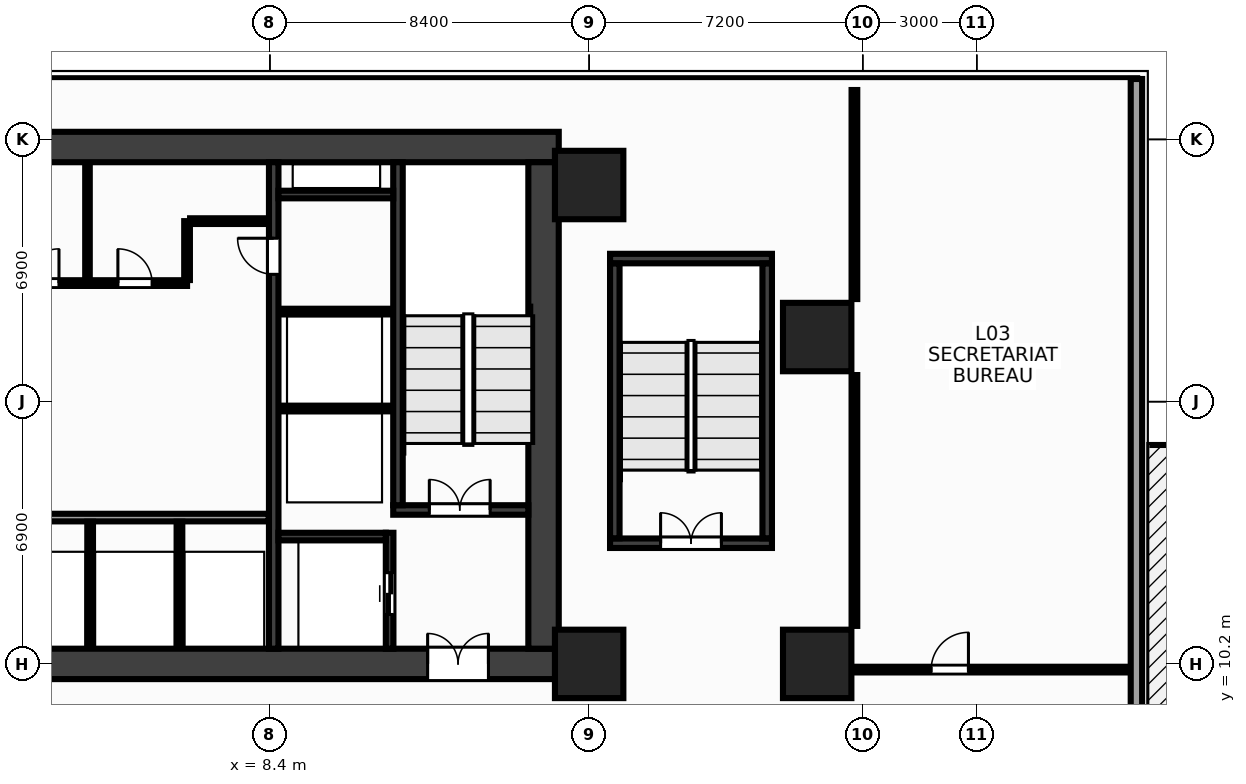
"""IFC4 building model, lengths in metres.
Left out: names, types, materials, properties, quantities, classifications, styles, units other than length and angle.
Written with IfcOpenShell. Run it as: python <this file> out.ifc"""

import sys

from ifc_helpers import new_model, si_unit, direction, frame, frame_2d, origin, origin_2d, place, context, subcontext, project, spatial, rectangle, extrude, source, transform, mapped, element, fill, save


model = new_model("IFC4")
c1 = context("Model", 3, precision=1e-05, world=origin(), true_north=direction((0.0, 1.0)))
c2 = subcontext(c1, "Body", "Model", "MODEL_VIEW")
j1 = project(units=[si_unit("LENGTHUNIT", "METRE"), si_unit("PLANEANGLEUNIT", "RADIAN")], contexts=[c1])
p1 = place(None, origin())
s1 = spatial("IfcSite", under=j1, at=p1, CompositionType="ELEMENT")
p2 = place(p1, origin())
s2 = spatial("IfcBuilding", under=s1, at=p2, CompositionType="ELEMENT")
p3 = place(p2, frame((0.0, 0.0, 14.3)))
s3 = spatial("IfcBuildingStorey", under=s2, at=p3, CompositionType="ELEMENT", Elevation=14.3)
m1 = source(origin(), c2, "Body", "SweptSolid", [
    extrude(rectangle(XDim=32.0, YDim=0.8, at=frame_2d((16.0, 0.0))), origin(), (0.0, 0.0, 1.0), 4.65),
])
p4 = place(p3, frame((-16.0, 23.8, 0.0), z_axis=(0.0, 0.0, 1.0), x_axis=(1.0, 0.0, 0.0)))
e1 = element("IfcWall", 1, at=p4, inside=s3, PredefinedType="SHEAR", context=c2, shape_type="MappedRepresentation", body=[
    mapped(m1, transform((0.0, 0.0, 0.0), x_axis=(1.0, 0.0, 0.0), y_axis=(0.0, 1.0, 0.0), z_axis=(0.0, 0.0, 1.0), scale=1.0)),
])
p5 = place(p3, frame((-16.0, 10.2, 0.0), z_axis=(0.0, 0.0, 1.0), x_axis=(1.0, 0.0, 0.0)))
e2 = element("IfcWall", 2, at=p5, inside=s3, PredefinedType="SHEAR", context=c2, shape_type="MappedRepresentation", body=[
    mapped(m1, transform((0.0, 0.0, 0.0), x_axis=(1.0, 0.0, 0.0), y_axis=(0.0, 1.0, 0.0), z_axis=(0.0, 0.0, 1.0), scale=1.0)),
])
p6 = place(p5, frame((1.85, 0.0, 0.0)))
e3 = element("IfcOpeningElement", 3, at=p6, cuts=e2, PredefinedType="OPENING", context=c2, shape_type="SweptSolid", body=[
    extrude(rectangle(XDim=1.6, YDim=2.15, at=frame_2d((0.8, 1.075))), frame((0.0, 0.412, 0.0), z_axis=(0.0, -1.0, 0.0), x_axis=(1.0, 0.0, 0.0)), (0.0, 0.0, 1.0), 0.824),
])
p7 = place(p5, frame((28.55, 0.0, 0.0)))
e4 = element("IfcOpeningElement", 4, at=p7, cuts=e2, PredefinedType="OPENING", context=c2, shape_type="SweptSolid", body=[
    extrude(rectangle(XDim=1.6, YDim=2.15, at=frame_2d((0.8, 1.075))), frame((0.0, 0.412, 0.0), z_axis=(0.0, -1.0, 0.0), x_axis=(1.0, 0.0, 0.0)), (0.0, 0.0, 1.0), 0.824),
])
p8 = place(p5, frame((15.25, 0.0, 0.0)))
e5 = element("IfcOpeningElement", 5, at=p8, cuts=e2, PredefinedType="OPENING", context=c2, shape_type="SweptSolid", body=[
    extrude(rectangle(XDim=1.5, YDim=2.2, at=frame_2d((0.75, 1.1))), frame((0.0, 0.412, 0.0), z_axis=(0.0, -1.0, 0.0), x_axis=(1.0, 0.0, 0.0)), (0.0, 0.0, 1.0), 0.824),
])
m2 = source(origin(), c2, "Body", "SweptSolid", [
    extrude(rectangle(XDim=12.8, YDim=0.8, at=frame_2d((6.4, 0.0))), origin(), (0.0, 0.0, 1.0), 4.65),
])
p9 = place(p3, frame((15.6, 10.6, 0.0), z_axis=(0.0, 0.0, 1.0), x_axis=(0.0, 1.0, 0.0)))
e6 = element("IfcWall", 6, at=p9, inside=s3, PredefinedType="SHEAR", context=c2, shape_type="MappedRepresentation", body=[
    mapped(m2, transform((0.0, 0.0, 0.0), x_axis=(1.0, 0.0, 0.0), y_axis=(0.0, 1.0, 0.0), z_axis=(0.0, 0.0, 1.0), scale=1.0)),
])
m3 = source(origin(), c2, "Body", "SweptSolid", [
    extrude(rectangle(XDim=12.8, YDim=0.25, at=frame_2d((6.4, 0.0))), origin(), (0.0, 0.0, 1.0), 4.65),
])
p10 = place(p3, frame((8.5, 10.6, 0.0), z_axis=(0.0, 0.0, 1.0), x_axis=(0.0, 1.0, 0.0)))
e7 = element("IfcWall", 7, at=p10, inside=s3, PredefinedType="SHEAR", context=c2, shape_type="MappedRepresentation", body=[
    mapped(m3, transform((0.0, 0.0, 0.0), x_axis=(1.0, 0.0, 0.0), y_axis=(0.0, 1.0, 0.0), z_axis=(0.0, 0.0, 1.0), scale=1.0)),
])
p11 = place(p10, frame((9.85, 0.0, 0.0)))
e8 = element("IfcOpeningElement", 8, at=p11, cuts=e7, PredefinedType="OPENING", context=c2, shape_type="SweptSolid", body=[
    extrude(rectangle(XDim=0.95, YDim=2.15, at=frame_2d((0.475, 1.075))), frame((0.0, 0.137, 0.0), z_axis=(0.0, -1.0, 0.0), x_axis=(1.0, 0.0, 0.0)), (0.0, 0.0, 1.0), 0.274),
])
m4 = source(origin(), c2, "Body", "SweptSolid", [
    extrude(rectangle(XDim=3.555, YDim=0.25, at=frame_2d((1.777, 0.0))), origin(), (0.0, 0.0, 1.0), 4.65),
])
p12 = place(p3, frame((11.645, 14.25, 0.0), z_axis=(0.0, 0.0, 1.0), x_axis=(1.0, 0.0, 0.0)))
e9 = element("IfcWall", 9, at=p12, inside=s3, PredefinedType="SHEAR", context=c2, shape_type="MappedRepresentation", body=[
    mapped(m4, transform((0.0, 0.0, 0.0), x_axis=(1.0, 0.0, 0.0), y_axis=(0.0, 1.0, 0.0), z_axis=(0.0, 0.0, 1.0), scale=1.0)),
])
p13 = place(p12, frame((0.95, 0.0, 0.0)))
e10 = element("IfcOpeningElement", 10, at=p13, cuts=e9, PredefinedType="OPENING", context=c2, shape_type="SweptSolid", body=[
    extrude(rectangle(XDim=1.6, YDim=2.15, at=frame_2d((0.8, 1.075))), frame((0.0, 0.137, 0.0), z_axis=(0.0, -1.0, 0.0), x_axis=(1.0, 0.0, 0.0)), (0.0, 0.0, 1.0), 0.274),
])
m5 = source(origin(), c2, "Body", "SweptSolid", [
    extrude(rectangle(XDim=9.025, YDim=0.25, at=frame_2d((4.512, 0.0))), origin(), (0.0, 0.0, 1.0), 4.65),
])
p14 = place(p3, frame((11.77, 14.375, 0.0), z_axis=(0.0, 0.0, 1.0), x_axis=(0.0, 1.0, 0.0)))
e11 = element("IfcWall", 11, at=p14, inside=s3, PredefinedType="SHEAR", context=c2, shape_type="MappedRepresentation", body=[
    mapped(m5, transform((0.0, 0.0, 0.0), x_axis=(1.0, 0.0, 0.0), y_axis=(0.0, 1.0, 0.0), z_axis=(0.0, 0.0, 1.0), scale=1.0)),
])
m6 = source(origin(), c2, "Body", "SweptSolid", [
    extrude(rectangle(XDim=3.05, YDim=0.2, at=frame_2d((1.525, 0.0))), origin(), (0.0, 0.0, 1.0), 4.65),
])
p15 = place(p3, frame((11.55, 10.6, 0.0), z_axis=(0.0, 0.0, 1.0), x_axis=(0.0, 1.0, 0.0)))
e12 = element("IfcWall", 12, at=p15, inside=s3, PredefinedType="SHEAR", context=c2, shape_type="MappedRepresentation", body=[
    mapped(m6, transform((0.0, 0.0, 0.0), x_axis=(1.0, 0.0, 0.0), y_axis=(0.0, 1.0, 0.0), z_axis=(0.0, 0.0, 1.0), scale=1.0)),
])
p16 = place(p15, frame((0.9, 0.0, 0.0)))
e13 = element("IfcOpeningElement", 13, at=p16, cuts=e12, PredefinedType="OPENING", context=c2, shape_type="SweptSolid", body=[
    extrude(rectangle(XDim=1.1, YDim=2.15, at=frame_2d((0.55, 1.075))), frame((0.0, 0.112, 0.0), z_axis=(0.0, -1.0, 0.0), x_axis=(1.0, 0.0, 0.0)), (0.0, 0.0, 1.0), 0.224),
])
m7 = source(origin(), c2, "Body", "SweptSolid", [
    extrude(rectangle(XDim=2.825, YDim=0.2, at=frame_2d((1.413, 0.0))), origin(), (0.0, 0.0, 1.0), 4.65),
])
p17 = place(p3, frame((8.625, 13.55, 0.0), z_axis=(0.0, 0.0, 1.0), x_axis=(1.0, 0.0, 0.0)))
e14 = element("IfcWall", 14, at=p17, inside=s3, PredefinedType="SHEAR", context=c2, shape_type="MappedRepresentation", body=[
    mapped(m7, transform((0.0, 0.0, 0.0), x_axis=(1.0, 0.0, 0.0), y_axis=(0.0, 1.0, 0.0), z_axis=(0.0, 0.0, 1.0), scale=1.0)),
])
m8 = source(origin(), c2, "Body", "SweptSolid", [
    extrude(rectangle(XDim=3.02, YDim=0.2, at=frame_2d((1.51, 0.0))), origin(), (0.0, 0.0, 1.0), 4.65),
])
p18 = place(p3, frame((8.625, 22.55, 0.0), z_axis=(0.0, 0.0, 1.0), x_axis=(1.0, 0.0, 0.0)))
e15 = element("IfcWall", 15, at=p18, inside=s3, PredefinedType="SHEAR", context=c2, shape_type="MappedRepresentation", body=[
    mapped(m8, transform((0.0, 0.0, 0.0), x_axis=(1.0, 0.0, 0.0), y_axis=(0.0, 1.0, 0.0), z_axis=(0.0, 0.0, 1.0), scale=1.0)),
])
m9 = source(origin(), c2, "Body", "SweptSolid", [
    extrude(rectangle(XDim=4.26, YDim=0.25, at=frame_2d((2.13, 0.0))), origin(), (0.0, 0.0, 1.0), 4.65),
])
p19 = place(p3, frame((17.35, 20.865, 0.0), z_axis=(0.0, 0.0, 1.0), x_axis=(1.0, 0.0, 0.0)))
e16 = element("IfcWall", 16, at=p19, inside=s3, PredefinedType="SHEAR", context=c2, shape_type="MappedRepresentation", body=[
    mapped(m9, transform((0.0, 0.0, 0.0), x_axis=(1.0, 0.0, 0.0), y_axis=(0.0, 1.0, 0.0), z_axis=(0.0, 0.0, 1.0), scale=1.0)),
])
p20 = place(p3, frame((17.35, 13.375, 0.0), z_axis=(0.0, 0.0, 1.0), x_axis=(1.0, 0.0, 0.0)))
e17 = element("IfcWall", 17, at=p20, inside=s3, PredefinedType="SHEAR", context=c2, shape_type="MappedRepresentation", body=[
    mapped(m9, transform((0.0, 0.0, 0.0), x_axis=(1.0, 0.0, 0.0), y_axis=(0.0, 1.0, 0.0), z_axis=(0.0, 0.0, 1.0), scale=1.0)),
])
p21 = place(p20, frame((1.33, 0.0, 0.0)))
e18 = element("IfcOpeningElement", 18, at=p21, cuts=e17, PredefinedType="OPENING", context=c2, shape_type="SweptSolid", body=[
    extrude(rectangle(XDim=1.6, YDim=2.15, at=frame_2d((0.8, 1.075))), frame((0.0, 0.137, 0.0), z_axis=(0.0, -1.0, 0.0), x_axis=(1.0, 0.0, 0.0)), (0.0, 0.0, 1.0), 0.274),
])
m10 = source(origin(), c2, "Body", "SweptSolid", [
    extrude(rectangle(XDim=7.23, YDim=0.25, at=frame_2d((3.615, 0.0))), origin(), (0.0, 0.0, 1.0), 4.65),
])
for number, where, z_axis, x_axis in (
    (19, (17.475, 13.505, 0.0), (0.0, 0.0, 1.0), (0.0, 1.0, 0.0)),
    (20, (21.485, 13.505, 0.0), (0.0, 0.0, 1.0), (0.0, 1.0, 0.0)),
):
    element("IfcWall", number, at=place(p3, frame(where, z_axis=z_axis, x_axis=x_axis)), inside=s3, PredefinedType="SHEAR", context=c2, shape_type="MappedRepresentation", body=[
        mapped(m10, transform((0.0, 0.0, 0.0), x_axis=(1.0, 0.0, 0.0), y_axis=(0.0, 1.0, 0.0), z_axis=(0.0, 0.0, 1.0), scale=1.0)),
    ])
m11 = source(origin(), c2, "Body", "SweptSolid", [
    extrude(rectangle(XDim=1.8, YDim=1.8, at=origin_2d()), origin(), (0.0, 0.0, 1.0), 4.65),
])
for number, where, z_axis, x_axis in (
    (21, (16.8, 10.2, 0.0), (0.0, 0.0, 1.0), (1.0, 0.0, 0.0)),
    (22, (16.8, 22.8, 0.0), (0.0, 0.0, 1.0), (1.0, 0.0, 0.0)),
    (23, (22.8, 10.2, 0.0), (0.0, 0.0, 1.0), (1.0, 0.0, 0.0)),
    (24, (22.8, 18.8, 0.0), (0.0, 0.0, 1.0), (1.0, 0.0, 0.0)),
):
    element("IfcColumn", number, at=place(p3, frame(where, z_axis=z_axis, x_axis=x_axis)), inside=s3, PredefinedType="COLUMN", context=c2, shape_type="MappedRepresentation", body=[
        mapped(m11, transform((0.0, 0.0, 0.0), x_axis=(1.0, 0.0, 0.0), y_axis=(0.0, 1.0, 0.0), z_axis=(0.0, 0.0, 1.0), scale=1.0)),
    ])
m12 = source(origin(), c2, "Body", "SweptSolid", [
    extrude(rectangle(XDim=52.79, YDim=0.3, at=frame_2d((26.395, 0.0))), origin(), (0.0, 0.0, 1.0), 3.83),
])
p22 = place(p3, frame((31.2, 25.59, 0.0), z_axis=(0.0, 0.0, 1.0), x_axis=(0.0, -1.0, 0.0)))
e25 = element("IfcWall", 25, at=p22, inside=s3, PredefinedType="STANDARD", context=c2, shape_type="MappedRepresentation", body=[
    mapped(m12, transform((0.0, 0.0, 0.0), x_axis=(1.0, 0.0, 0.0), y_axis=(0.0, 1.0, 0.0), z_axis=(0.0, 0.0, 1.0), scale=1.0)),
])
p23 = place(p22, frame((30.65, 0.0, 0.0)))
e26 = element("IfcOpeningElement", 26, at=p23, cuts=e25, PredefinedType="OPENING", context=c2, shape_type="SweptSolid", body=[
    extrude(rectangle(XDim=1.8, YDim=2.2, at=frame_2d((0.9, 1.1))), frame((0.0, 0.162, 0.0), z_axis=(0.0, -1.0, 0.0), x_axis=(1.0, 0.0, 0.0)), (0.0, 0.0, 1.0), 0.324),
])
m13 = source(origin(), c2, "Body", "SweptSolid", [
    extrude(rectangle(XDim=3.01, YDim=0.15, at=frame_2d((1.505, 0.0))), origin(), (0.0, 0.0, 1.0), 4.33),
])
for number, where, z_axis, x_axis in (
    (27, (8.63, 16.92, 0.0), (0.0, 0.0, 1.0), (1.0, 0.0, 0.0)),
    (28, (8.63, 19.47, 0.0), (0.0, 0.0, 1.0), (1.0, 0.0, 0.0)),
):
    element("IfcWall", number, at=place(p3, frame(where, z_axis=z_axis, x_axis=x_axis)), inside=s3, PredefinedType="PARTITIONING", context=c2, shape_type="MappedRepresentation", body=[
        mapped(m13, transform((0.0, 0.0, 0.0), x_axis=(1.0, 0.0, 0.0), y_axis=(0.0, 1.0, 0.0), z_axis=(0.0, 0.0, 1.0), scale=1.0)),
    ])
m14 = source(origin(), c2, "Body", "SweptSolid", [
    extrude(rectangle(XDim=7.07, YDim=0.2, at=frame_2d((3.535, 0.0))), origin(), (0.0, 0.0, 1.0), 4.33),
])
p24 = place(p3, frame((1.3, 14.05, 0.0), z_axis=(0.0, 0.0, 1.0), x_axis=(1.0, 0.0, 0.0)))
e29 = element("IfcWall", 29, at=p24, inside=s3, PredefinedType="PARTITIONING", context=c2, shape_type="MappedRepresentation", body=[
    mapped(m14, transform((0.0, 0.0, 0.0), x_axis=(1.0, 0.0, 0.0), y_axis=(0.0, 1.0, 0.0), z_axis=(0.0, 0.0, 1.0), scale=1.0)),
])
m15 = source(origin(), c2, "Body", "SweptSolid", [
    extrude(rectangle(XDim=14.59, YDim=0.15, at=frame_2d((7.295, 0.0))), origin(), (0.0, 0.0, 1.0), 4.33),
])
p25 = place(p3, frame((-8.37, 20.22, 0.0), z_axis=(0.0, 0.0, 1.0), x_axis=(1.0, 0.0, 0.0)))
e30 = element("IfcWall", 30, at=p25, inside=s3, PredefinedType="PARTITIONING", context=c2, shape_type="MappedRepresentation", body=[
    mapped(m15, transform((0.0, 0.0, 0.0), x_axis=(1.0, 0.0, 0.0), y_axis=(0.0, 1.0, 0.0), z_axis=(0.0, 0.0, 1.0), scale=1.0)),
])
p26 = place(p25, frame((4.36, 0.0, 0.0)))
e31 = element("IfcOpeningElement", 31, at=p26, cuts=e30, PredefinedType="OPENING", context=c2, shape_type="SweptSolid", body=[
    extrude(rectangle(XDim=0.9, YDim=2.15, at=frame_2d((0.45, 1.075))), frame((0.0, 0.087, 0.0), z_axis=(0.0, -1.0, 0.0), x_axis=(1.0, 0.0, 0.0)), (0.0, 0.0, 1.0), 0.174),
])
p27 = place(p25, frame((10.32, 0.0, 0.0)))
e32 = element("IfcOpeningElement", 32, at=p27, cuts=e30, PredefinedType="OPENING", context=c2, shape_type="SweptSolid", body=[
    extrude(rectangle(XDim=0.9, YDim=2.15, at=frame_2d((0.45, 1.075))), frame((0.0, 0.087, 0.0), z_axis=(0.0, -1.0, 0.0), x_axis=(1.0, 0.0, 0.0)), (0.0, 0.0, 1.0), 0.174),
])
p28 = place(p25, frame((12.77, 0.0, 0.0)))
e33 = element("IfcOpeningElement", 33, at=p28, cuts=e30, PredefinedType="OPENING", context=c2, shape_type="SweptSolid", body=[
    extrude(rectangle(XDim=0.9, YDim=2.15, at=frame_2d((0.45, 1.075))), frame((0.0, 0.087, 0.0), z_axis=(0.0, -1.0, 0.0), x_axis=(1.0, 0.0, 0.0)), (0.0, 0.0, 1.0), 0.174),
])
m16 = source(origin(), c2, "Body", "SweptSolid", [
    extrude(rectangle(XDim=1.55, YDim=0.15, at=frame_2d((0.775, 0.0))), origin(), (0.0, 0.0, 1.0), 4.33),
])
p29 = place(p3, frame((6.22, 20.3, 0.0), z_axis=(0.0, 0.0, 1.0), x_axis=(0.0, 1.0, 0.0)))
e34 = element("IfcWall", 34, at=p29, inside=s3, PredefinedType="PARTITIONING", context=c2, shape_type="MappedRepresentation", body=[
    mapped(m16, transform((0.0, 0.0, 0.0), x_axis=(1.0, 0.0, 0.0), y_axis=(0.0, 1.0, 0.0), z_axis=(0.0, 0.0, 1.0), scale=1.0)),
])
m17 = source(origin(), c2, "Body", "SweptSolid", [
    extrude(rectangle(XDim=2.07, YDim=0.15, at=frame_2d((1.035, 0.0))), origin(), (0.0, 0.0, 1.0), 4.33),
])
p30 = place(p3, frame((6.3, 21.85, 0.0), z_axis=(0.0, 0.0, 1.0), x_axis=(1.0, 0.0, 0.0)))
e35 = element("IfcWall", 35, at=p30, inside=s3, PredefinedType="PARTITIONING", context=c2, shape_type="MappedRepresentation", body=[
    mapped(m17, transform((0.0, 0.0, 0.0), x_axis=(1.0, 0.0, 0.0), y_axis=(0.0, 1.0, 0.0), z_axis=(0.0, 0.0, 1.0), scale=1.0)),
])
m18 = source(origin(), c2, "Body", "SweptSolid", [
    extrude(rectangle(XDim=3.34, YDim=0.15, at=frame_2d((1.67, 0.0))), origin(), (0.0, 0.0, 1.0), 4.33),
])
for number, where, z_axis, x_axis in (
    (36, (3.67, 10.6, 0.0), (0.0, 0.0, 1.0), (0.0, 1.0, 0.0)),
    (37, (6.02, 10.6, 0.0), (0.0, 0.0, 1.0), (0.0, 1.0, 0.0)),
):
    element("IfcWall", number, at=place(p3, frame(where, z_axis=z_axis, x_axis=x_axis)), inside=s3, PredefinedType="PARTITIONING", context=c2, shape_type="MappedRepresentation", body=[
        mapped(m18, transform((0.0, 0.0, 0.0), x_axis=(1.0, 0.0, 0.0), y_axis=(0.0, 1.0, 0.0), z_axis=(0.0, 0.0, 1.0), scale=1.0)),
    ])
m19 = source(origin(), c2, "Body", "SweptSolid", [
    extrude(rectangle(XDim=3.04, YDim=0.12, at=frame_2d((1.52, 0.0))), origin(), (0.0, 0.0, 1.0), 4.33),
])
p31 = place(p3, frame((3.6, 20.32, 0.0), z_axis=(0.0, 0.0, 1.0), x_axis=(0.0, 1.0, 0.0)))
e38 = element("IfcWall", 38, at=p31, inside=s3, PredefinedType="PARTITIONING", context=c2, shape_type="MappedRepresentation", body=[
    mapped(m19, transform((0.0, 0.0, 0.0), x_axis=(1.0, 0.0, 0.0), y_axis=(0.0, 1.0, 0.0), z_axis=(0.0, 0.0, 1.0), scale=1.0)),
])
m20 = source(origin(), c2, "Body", "SweptSolid", [
    extrude(rectangle(XDim=7.2, YDim=0.15, at=frame_2d((3.6, 0.0))), origin(), (0.0, 0.0, 1.0), 4.33),
])
p32 = place(p3, frame((23.8, 10.05, 0.0), z_axis=(0.0, 0.0, 1.0), x_axis=(1.0, 0.0, 0.0)))
e39 = element("IfcWall", 39, at=p32, inside=s3, PredefinedType="PARTITIONING", context=c2, shape_type="MappedRepresentation", body=[
    mapped(m20, transform((0.0, 0.0, 0.0), x_axis=(1.0, 0.0, 0.0), y_axis=(0.0, 1.0, 0.0), z_axis=(0.0, 0.0, 1.0), scale=1.0)),
])
p33 = place(p32, frame((2.0, 0.0, 0.0)))
e40 = element("IfcOpeningElement", 40, at=p33, cuts=e39, PredefinedType="OPENING", context=c2, shape_type="SweptSolid", body=[
    extrude(rectangle(XDim=0.98, YDim=2.15, at=frame_2d((0.49, 1.075))), frame((0.0, 0.087, 0.0), z_axis=(0.0, -1.0, 0.0), x_axis=(1.0, 0.0, 0.0)), (0.0, 0.0, 1.0), 0.174),
])
m21 = source(origin(), c2, "Body", "SweptSolid", [
    extrude(rectangle(XDim=6.6, YDim=0.15, at=frame_2d((3.3, 0.0))), origin(), (0.0, 0.0, 1.0), 4.33),
])
p34 = place(p3, frame((23.78, 11.2, 0.0), z_axis=(0.0, 0.0, 1.0), x_axis=(0.0, 1.0, 0.0)))
e41 = element("IfcWall", 41, at=p34, inside=s3, PredefinedType="PARTITIONING", context=c2, shape_type="MappedRepresentation", body=[
    mapped(m21, transform((0.0, 0.0, 0.0), x_axis=(1.0, 0.0, 0.0), y_axis=(0.0, 1.0, 0.0), z_axis=(0.0, 0.0, 1.0), scale=1.0)),
])
m22 = source(origin(), c2, "Body", "SweptSolid", [
    extrude(rectangle(XDim=5.5, YDim=0.15, at=frame_2d((2.75, 0.0))), origin(), (0.0, 0.0, 1.0), 4.33),
])
p35 = place(p3, frame((23.78, 19.8, 0.0), z_axis=(0.0, 0.0, 1.0), x_axis=(0.0, 1.0, 0.0)))
e42 = element("IfcWall", 42, at=p35, inside=s3, PredefinedType="PARTITIONING", context=c2, shape_type="MappedRepresentation", body=[
    mapped(m22, transform((0.0, 0.0, 0.0), x_axis=(1.0, 0.0, 0.0), y_axis=(0.0, 1.0, 0.0), z_axis=(0.0, 0.0, 1.0), scale=1.0)),
])
m23 = source(origin(), c2, "Body", "SweptSolid", [
    extrude(rectangle(XDim=1.6, YDim=2.15, at=frame_2d((0.8, 1.075))), frame((0.0, 0.025, 0.0), z_axis=(0.0, -1.0, 0.0), x_axis=(1.0, 0.0, 0.0)), (0.0, 0.0, 1.0), 0.05),
])
p36 = place(p13, origin())
e43 = element("IfcDoor", 43, at=p36, inside=s3, OperationType="DOUBLE_DOOR_SINGLE_SWING", PredefinedType="DOOR", context=c2, shape_type="MappedRepresentation", body=[
    mapped(m23, transform((0.0, 0.0, 0.0), x_axis=(1.0, 0.0, 0.0), y_axis=(0.0, 1.0, 0.0), z_axis=(0.0, 0.0, 1.0), scale=1.0)),
])
fill(e10, e43)
p37 = place(p7, origin())
e44 = element("IfcDoor", 44, at=p37, inside=s3, OperationType="DOUBLE_DOOR_SINGLE_SWING", PredefinedType="DOOR", context=c2, shape_type="MappedRepresentation", body=[
    mapped(m23, transform((0.0, 0.0, 0.0), x_axis=(1.0, 0.0, 0.0), y_axis=(0.0, 1.0, 0.0), z_axis=(0.0, 0.0, 1.0), scale=1.0)),
])
fill(e4, e44)
m24 = source(origin(), c2, "Body", "SweptSolid", [
    extrude(rectangle(XDim=1.1, YDim=2.15, at=frame_2d((0.55, 1.075))), frame((0.0, 0.025, 0.0), z_axis=(0.0, -1.0, 0.0), x_axis=(1.0, 0.0, 0.0)), (0.0, 0.0, 1.0), 0.05),
])
p38 = place(p16, origin())
e45 = element("IfcDoor", 45, at=p38, inside=s3, OperationType="DOUBLE_DOOR_SLIDING", PredefinedType="DOOR", context=c2, shape_type="MappedRepresentation", body=[
    mapped(m24, transform((0.0, 0.0, 0.0), x_axis=(1.0, 0.0, 0.0), y_axis=(0.0, 1.0, 0.0), z_axis=(0.0, 0.0, 1.0), scale=1.0)),
])
fill(e13, e45)
p39 = place(p21, origin())
e46 = element("IfcDoor", 46, at=p39, inside=s3, OperationType="DOUBLE_DOOR_SINGLE_SWING", PredefinedType="DOOR", context=c2, shape_type="MappedRepresentation", body=[
    mapped(m23, transform((0.0, 0.0, 0.0), x_axis=(1.0, 0.0, 0.0), y_axis=(0.0, 1.0, 0.0), z_axis=(0.0, 0.0, 1.0), scale=1.0)),
])
fill(e18, e46)
m25 = source(origin(), c2, "Body", "SweptSolid", [
    extrude(rectangle(XDim=0.95, YDim=2.15, at=frame_2d((0.475, 1.075))), frame((0.0, 0.025, 0.0), z_axis=(0.0, -1.0, 0.0), x_axis=(1.0, 0.0, 0.0)), (0.0, 0.0, 1.0), 0.05),
])
p40 = place(p11, origin())
e47 = element("IfcDoor", 47, at=p40, inside=s3, OperationType="SINGLE_SWING_RIGHT", PredefinedType="DOOR", context=c2, shape_type="MappedRepresentation", body=[
    mapped(m25, transform((0.0, 0.0, 0.0), x_axis=(1.0, 0.0, 0.0), y_axis=(0.0, 1.0, 0.0), z_axis=(0.0, 0.0, 1.0), scale=1.0)),
])
fill(e8, e47)
m26 = source(origin(), c2, "Body", "SweptSolid", [
    extrude(rectangle(XDim=0.9, YDim=2.15, at=frame_2d((0.45, 1.075))), frame((0.0, 0.025, 0.0), z_axis=(0.0, -1.0, 0.0), x_axis=(1.0, 0.0, 0.0)), (0.0, 0.0, 1.0), 0.05),
])
p41 = place(p27, origin())
e48 = element("IfcDoor", 48, at=p41, inside=s3, OperationType="SINGLE_SWING_RIGHT", PredefinedType="DOOR", context=c2, shape_type="MappedRepresentation", body=[
    mapped(m26, transform((0.0, 0.0, 0.0), x_axis=(1.0, 0.0, 0.0), y_axis=(0.0, 1.0, 0.0), z_axis=(0.0, 0.0, 1.0), scale=1.0)),
])
fill(e32, e48)
p42 = place(p28, origin())
e49 = element("IfcDoor", 49, at=p42, inside=s3, OperationType="SINGLE_SWING_LEFT", PredefinedType="DOOR", context=c2, shape_type="MappedRepresentation", body=[
    mapped(m26, transform((0.0, 0.0, 0.0), x_axis=(1.0, 0.0, 0.0), y_axis=(0.0, 1.0, 0.0), z_axis=(0.0, 0.0, 1.0), scale=1.0)),
])
fill(e33, e49)
m27 = source(origin(), c2, "Body", "SweptSolid", [
    extrude(rectangle(XDim=0.98, YDim=2.15, at=frame_2d((0.49, 1.075))), frame((0.0, 0.025, 0.0), z_axis=(0.0, -1.0, 0.0), x_axis=(1.0, 0.0, 0.0)), (0.0, 0.0, 1.0), 0.05),
])
p43 = place(p33, origin())
e50 = element("IfcDoor", 50, at=p43, inside=s3, OperationType="SINGLE_SWING_RIGHT", PredefinedType="DOOR", context=c2, shape_type="MappedRepresentation", body=[
    mapped(m27, transform((0.0, 0.0, 0.0), x_axis=(1.0, 0.0, 0.0), y_axis=(0.0, 1.0, 0.0), z_axis=(0.0, 0.0, 1.0), scale=1.0)),
])
fill(e40, e50)
save(model, sys.argv[1])
